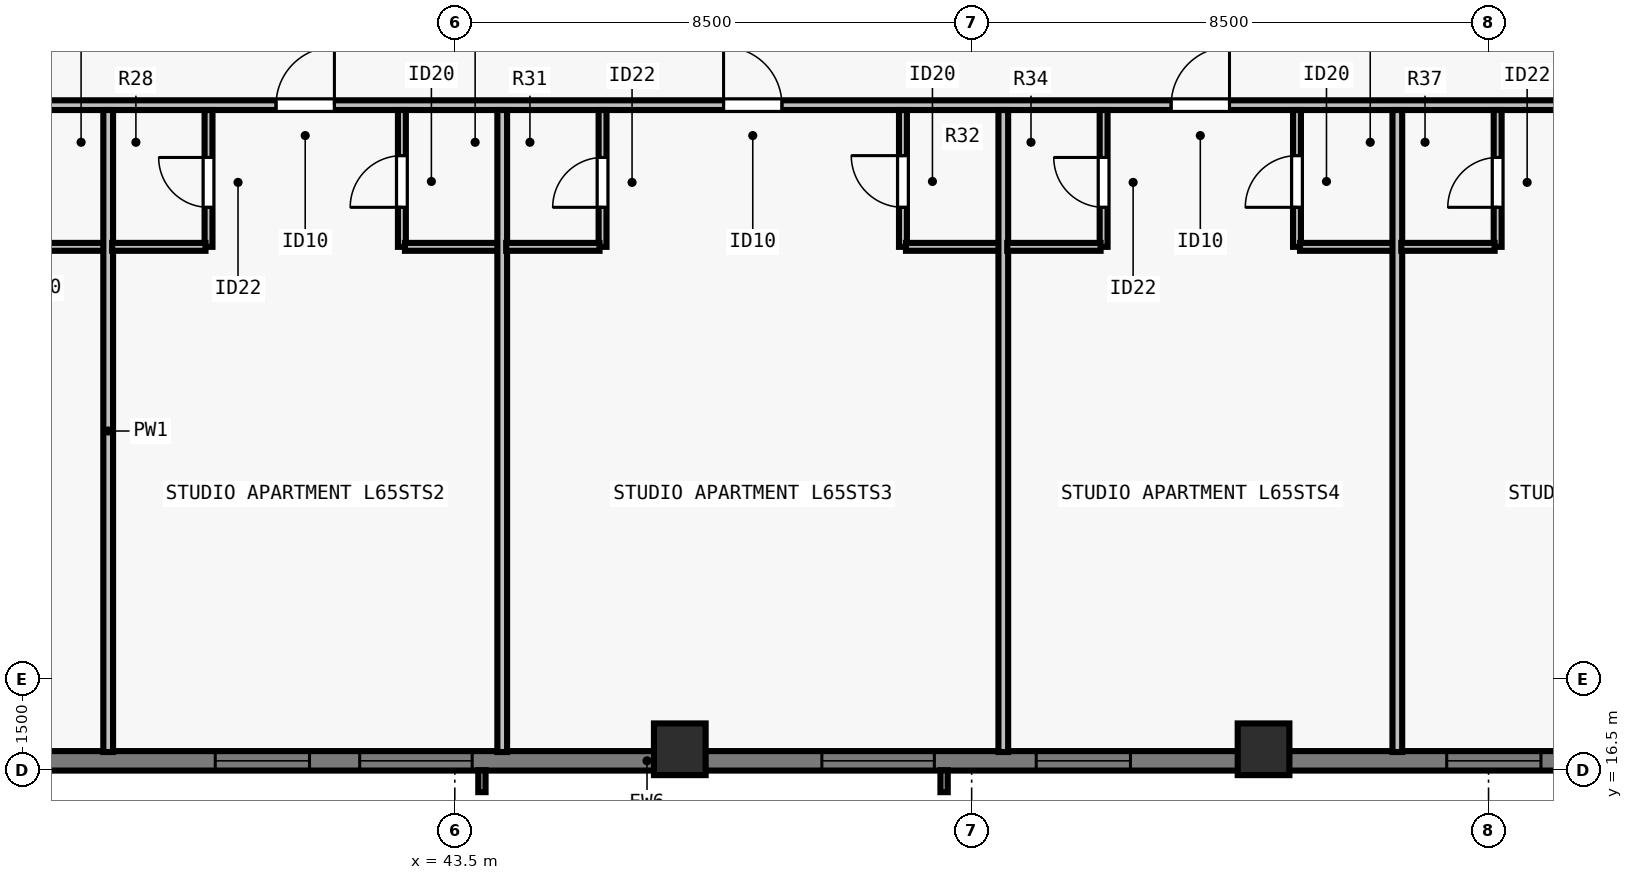
"""IFC4 building model, lengths in metres.
Left out: names, types, materials, properties, quantities, classifications, styles, units other than length and angle.
Written with IfcOpenShell. Run it as: python <this file> out.ifc"""

import sys

from ifc_helpers import new_model, si_unit, direction, frame, frame_2d, origin, origin_2d, place, context, subcontext, project, spatial, rectangle, extrude, element, fill, save


model = new_model("IFC4")
c1 = context("Model", 3, precision=1e-05, world=origin(), true_north=direction((0.0, 1.0)))
c2 = subcontext(c1, "Body", "Model", "MODEL_VIEW")
j1 = project(units=[si_unit("LENGTHUNIT", "METRE"), si_unit("PLANEANGLEUNIT", "RADIAN")], contexts=[c1])
p1 = place(None, origin())
s1 = spatial("IfcSite", under=j1, at=p1, CompositionType="ELEMENT")
p2 = place(p1, origin())
s2 = spatial("IfcBuilding", under=s1, at=p2, CompositionType="ELEMENT")
p3 = place(p2, frame((0.0, 0.0, 237.5)))
s3 = spatial("IfcBuildingStorey", under=s2, at=p3, CompositionType="ELEMENT", Elevation=237.5)
for number, where, z_axis, x_axis in (
    (1, (47.2, 16.85, 0.0), (0.0, 0.0, 1.0), (1.0, 0.0, 0.0)),
    (2, (56.8, 16.85, 0.0), (0.0, 0.0, 1.0), (1.0, 0.0, 0.0)),
):
    element("IfcColumn", number, at=place(p3, frame(where, z_axis=z_axis, x_axis=x_axis)), inside=s3, PredefinedType="COLUMN", context=c2, shape_type="SweptSolid", body=[
        extrude(rectangle(XDim=0.85, YDim=0.85, at=origin_2d()), origin(), (0.0, 0.0, 1.0), 3.5),
    ])
p4 = place(p3, frame((69.5, 16.66, 0.0), z_axis=(0.0, 0.0, 1.0), x_axis=(-1.0, 0.0, 0.0)))
e3 = element("IfcWall", 3, at=p4, inside=s3, PredefinedType="SOLIDWALL", context=c2, shape_type="SweptSolid", body=[
    extrude(rectangle(XDim=34.702, YDim=0.32, at=frame_2d((17.351, 0.0))), origin(), (0.0, 0.0, 1.0), 3.29),
])
p5 = place(p4, frame((4.613, 0.0, 0.8)))
e4 = element("IfcOpeningElement", 4, at=p5, cuts=e3, PredefinedType="OPENING", context=c2, shape_type="SweptSolid", body=[
    extrude(rectangle(XDim=1.85, YDim=1.678, at=frame_2d((0.925, 0.839))), frame((0.0, 0.17, 0.0), z_axis=(0.0, -1.0, 0.0), x_axis=(1.0, 0.0, 0.0)), (0.0, 0.0, 1.0), 0.34),
])
p6 = place(p4, frame((8.138, 0.0, 0.8)))
e5 = element("IfcOpeningElement", 5, at=p6, cuts=e3, PredefinedType="OPENING", context=c2, shape_type="SweptSolid", body=[
    extrude(rectangle(XDim=1.55, YDim=1.678, at=frame_2d((0.775, 0.839))), frame((0.0, 0.17, 0.0), z_axis=(0.0, -1.0, 0.0), x_axis=(1.0, 0.0, 0.0)), (0.0, 0.0, 1.0), 0.34),
])
p7 = place(p4, frame((14.888, 0.0, 0.8)))
e6 = element("IfcOpeningElement", 6, at=p7, cuts=e3, PredefinedType="OPENING", context=c2, shape_type="SweptSolid", body=[
    extrude(rectangle(XDim=1.55, YDim=1.678, at=frame_2d((0.775, 0.839))), frame((0.0, 0.17, 0.0), z_axis=(0.0, -1.0, 0.0), x_axis=(1.0, 0.0, 0.0)), (0.0, 0.0, 1.0), 0.34),
])
p8 = place(p4, frame((18.114, 0.0, 0.8)))
e7 = element("IfcOpeningElement", 7, at=p8, cuts=e3, PredefinedType="OPENING", context=c2, shape_type="SweptSolid", body=[
    extrude(rectangle(XDim=1.85, YDim=1.678, at=frame_2d((0.925, 0.839))), frame((0.0, 0.17, 0.0), z_axis=(0.0, -1.0, 0.0), x_axis=(1.0, 0.0, 0.0)), (0.0, 0.0, 1.0), 0.34),
])
p9 = place(p4, frame((25.714, 0.0, 0.8)))
e8 = element("IfcOpeningElement", 8, at=p9, cuts=e3, PredefinedType="OPENING", context=c2, shape_type="SweptSolid", body=[
    extrude(rectangle(XDim=1.85, YDim=1.678, at=frame_2d((0.925, 0.839))), frame((0.0, 0.17, 0.0), z_axis=(0.0, -1.0, 0.0), x_axis=(1.0, 0.0, 0.0)), (0.0, 0.0, 1.0), 0.34),
])
p10 = place(p4, frame((28.389, 0.0, 0.8)))
e9 = element("IfcOpeningElement", 9, at=p10, cuts=e3, PredefinedType="OPENING", context=c2, shape_type="SweptSolid", body=[
    extrude(rectangle(XDim=1.55, YDim=1.678, at=frame_2d((0.775, 0.839))), frame((0.0, 0.17, 0.0), z_axis=(0.0, -1.0, 0.0), x_axis=(1.0, 0.0, 0.0)), (0.0, 0.0, 1.0), 0.34),
])
p11 = place(p3, frame((29.805, 27.442, 0.0), z_axis=(0.0, 0.0, 1.0), x_axis=(1.0, 0.0, 0.0)))
e10 = element("IfcWall", 10, at=p11, inside=s3, PredefinedType="PARTITIONING", context=c2, shape_type="SweptSolid", body=[
    extrude(rectangle(XDim=44.39, YDim=0.16, at=frame_2d((22.195, 0.0))), origin(), (0.0, 0.0, 1.0), 2.958),
])
p12 = place(p11, frame((3.575, 0.0, 0.0)))
e11 = element("IfcOpeningElement", 11, at=p12, cuts=e10, PredefinedType="OPENING", context=c2, shape_type="SweptSolid", body=[
    extrude(rectangle(XDim=0.96, YDim=2.18, at=frame_2d((0.48, 1.09))), frame((0.0, 0.09, 0.0), z_axis=(0.0, -1.0, 0.0), x_axis=(1.0, 0.0, 0.0)), (0.0, 0.0, 1.0), 0.18),
])
p13 = place(p11, frame((10.755, 0.0, 0.0)))
e12 = element("IfcOpeningElement", 12, at=p13, cuts=e10, PredefinedType="OPENING", context=c2, shape_type="SweptSolid", body=[
    extrude(rectangle(XDim=0.96, YDim=2.18, at=frame_2d((0.48, 1.09))), frame((0.0, 0.09, 0.0), z_axis=(0.0, -1.0, 0.0), x_axis=(1.0, 0.0, 0.0)), (0.0, 0.0, 1.0), 0.18),
])
p14 = place(p11, frame((18.115, 0.0, 0.0)))
e13 = element("IfcOpeningElement", 13, at=p14, cuts=e10, PredefinedType="OPENING", context=c2, shape_type="SweptSolid", body=[
    extrude(rectangle(XDim=0.96, YDim=2.18, at=frame_2d((0.48, 1.09))), frame((0.0, 0.09, 0.0), z_axis=(0.0, -1.0, 0.0), x_axis=(1.0, 0.0, 0.0)), (0.0, 0.0, 1.0), 0.18),
])
p15 = place(p11, frame((25.475, 0.0, 0.0)))
e14 = element("IfcOpeningElement", 14, at=p15, cuts=e10, PredefinedType="OPENING", context=c2, shape_type="SweptSolid", body=[
    extrude(rectangle(XDim=0.96, YDim=2.18, at=frame_2d((0.48, 1.09))), frame((0.0, 0.09, 0.0), z_axis=(0.0, -1.0, 0.0), x_axis=(1.0, 0.0, 0.0)), (0.0, 0.0, 1.0), 0.18),
])
p16 = place(p11, frame((32.835, 0.0, 0.0)))
e15 = element("IfcOpeningElement", 15, at=p16, cuts=e10, PredefinedType="OPENING", context=c2, shape_type="SweptSolid", body=[
    extrude(rectangle(XDim=0.96, YDim=2.18, at=frame_2d((0.48, 1.09))), frame((0.0, 0.09, 0.0), z_axis=(0.0, -1.0, 0.0), x_axis=(1.0, 0.0, 0.0)), (0.0, 0.0, 1.0), 0.18),
])
p17 = place(p11, frame((40.375, 0.0, 0.0)))
e16 = element("IfcOpeningElement", 16, at=p17, cuts=e10, PredefinedType="OPENING", context=c2, shape_type="SweptSolid", body=[
    extrude(rectangle(XDim=0.96, YDim=2.18, at=frame_2d((0.48, 1.09))), frame((0.0, 0.09, 0.0), z_axis=(0.0, -1.0, 0.0), x_axis=(1.0, 0.0, 0.0)), (0.0, 0.0, 1.0), 0.18),
])
p18 = place(p3, frame((36.2, 25.113, 0.0), z_axis=(0.0, 0.0, 1.0), x_axis=(1.0, 0.0, 0.0)))
e17 = element("IfcWall", 17, at=p18, inside=s3, PredefinedType="PLUMBINGWALL", context=c2, shape_type="SweptSolid", body=[
    extrude(rectangle(XDim=1.6, YDim=0.13, at=frame_2d((0.8, 0.0))), origin(), (0.0, 0.0, 1.0), 3.29),
])
p19 = place(p3, frame((37.8, 16.805, 0.0), z_axis=(0.0, 0.0, 1.0), x_axis=(0.0, 1.0, 0.0)))
e18 = element("IfcWall", 18, at=p19, inside=s3, PredefinedType="PARTITIONING", context=c2, shape_type="SweptSolid", body=[
    extrude(rectangle(XDim=10.558, YDim=0.16, at=frame_2d((5.279, 0.0))), origin(), (0.0, 0.0, 1.0), 2.573),
])
p20 = place(p3, frame((39.45, 25.113, 0.0), z_axis=(0.0, 0.0, 1.0), x_axis=(0.0, 1.0, 0.0)))
e19 = element("IfcWall", 19, at=p20, inside=s3, PredefinedType="PLUMBINGWALL", context=c2, shape_type="SweptSolid", body=[
    extrude(rectangle(XDim=2.25, YDim=0.13, at=frame_2d((1.125, 0.0))), origin(), (0.0, 0.0, 1.0), 3.29),
])
p21 = place(p20, frame((0.65, 0.0, 0.0)))
e20 = element("IfcOpeningElement", 20, at=p21, cuts=e19, PredefinedType="OPENING", context=c2, shape_type="SweptSolid", body=[
    extrude(rectangle(XDim=0.82, YDim=2.1, at=frame_2d((0.41, 1.05))), frame((0.0, 0.075, 0.0), z_axis=(0.0, -1.0, 0.0), x_axis=(1.0, 0.0, 0.0)), (0.0, 0.0, 1.0), 0.15),
])
p22 = place(p3, frame((37.865, 25.113, 0.0), z_axis=(0.0, 0.0, 1.0), x_axis=(1.0, 0.0, 0.0)))
e21 = element("IfcWall", 21, at=p22, inside=s3, PredefinedType="PLUMBINGWALL", context=c2, shape_type="SweptSolid", body=[
    extrude(rectangle(XDim=1.535, YDim=0.13, at=frame_2d((0.768, 0.0))), origin(), (0.0, 0.0, 1.0), 3.29),
])
p23 = place(p3, frame((42.63, 25.113, 0.0), z_axis=(0.0, 0.0, 1.0), x_axis=(0.0, 1.0, 0.0)))
e22 = element("IfcWall", 22, at=p23, inside=s3, PredefinedType="PLUMBINGWALL", context=c2, shape_type="SweptSolid", body=[
    extrude(rectangle(XDim=2.25, YDim=0.13, at=frame_2d((1.125, 0.0))), origin(), (0.0, 0.0, 1.0), 3.29),
])
p24 = place(p23, frame((0.65, 0.0, 0.0)))
e23 = element("IfcOpeningElement", 23, at=p24, cuts=e22, PredefinedType="OPENING", context=c2, shape_type="SweptSolid", body=[
    extrude(rectangle(XDim=0.85, YDim=2.1, at=frame_2d((0.425, 1.05))), frame((0.0, 0.075, 0.0), z_axis=(0.0, -1.0, 0.0), x_axis=(1.0, 0.0, 0.0)), (0.0, 0.0, 1.0), 0.15),
])
p25 = place(p3, frame((42.68, 25.113, 0.0), z_axis=(0.0, 0.0, 1.0), x_axis=(1.0, 0.0, 0.0)))
e24 = element("IfcWall", 24, at=p25, inside=s3, PredefinedType="PLUMBINGWALL", context=c2, shape_type="SweptSolid", body=[
    extrude(rectangle(XDim=1.6, YDim=0.13, at=frame_2d((0.8, 0.0))), origin(), (0.0, 0.0, 1.0), 3.29),
])
p26 = place(p3, frame((44.28, 16.805, 0.0), z_axis=(0.0, 0.0, 1.0), x_axis=(0.0, 1.0, 0.0)))
e25 = element("IfcWall", 25, at=p26, inside=s3, PredefinedType="PARTITIONING", context=c2, shape_type="SweptSolid", body=[
    extrude(rectangle(XDim=10.558, YDim=0.16, at=frame_2d((5.279, 0.0))), origin(), (0.0, 0.0, 1.0), 3.29),
])
p27 = place(p3, frame((45.93, 25.113, 0.0), z_axis=(0.0, 0.0, 1.0), x_axis=(0.0, 1.0, 0.0)))
e26 = element("IfcWall", 26, at=p27, inside=s3, PredefinedType="PLUMBINGWALL", context=c2, shape_type="SweptSolid", body=[
    extrude(rectangle(XDim=2.25, YDim=0.13, at=frame_2d((1.125, 0.0))), origin(), (0.0, 0.0, 1.0), 3.29),
])
p28 = place(p27, frame((0.65, 0.0, 0.0)))
e27 = element("IfcOpeningElement", 27, at=p28, cuts=e26, PredefinedType="OPENING", context=c2, shape_type="SweptSolid", body=[
    extrude(rectangle(XDim=0.82, YDim=2.1, at=frame_2d((0.41, 1.05))), frame((0.0, 0.075, 0.0), z_axis=(0.0, -1.0, 0.0), x_axis=(1.0, 0.0, 0.0)), (0.0, 0.0, 1.0), 0.15),
])
p29 = place(p3, frame((44.345, 25.113, 0.0), z_axis=(0.0, 0.0, 1.0), x_axis=(1.0, 0.0, 0.0)))
e28 = element("IfcWall", 28, at=p29, inside=s3, PredefinedType="PLUMBINGWALL", context=c2, shape_type="SweptSolid", body=[
    extrude(rectangle(XDim=1.535, YDim=0.13, at=frame_2d((0.768, 0.0))), origin(), (0.0, 0.0, 1.0), 3.29),
])
p30 = place(p3, frame((50.87, 25.113, 0.0), z_axis=(0.0, 0.0, 1.0), x_axis=(0.0, 1.0, 0.0)))
e29 = element("IfcWall", 29, at=p30, inside=s3, PredefinedType="PLUMBINGWALL", context=c2, shape_type="SweptSolid", body=[
    extrude(rectangle(XDim=2.25, YDim=0.13, at=frame_2d((1.125, 0.0))), origin(), (0.0, 0.0, 1.0), 3.29),
])
p31 = place(p30, frame((0.65, 0.0, 0.0)))
e30 = element("IfcOpeningElement", 30, at=p31, cuts=e29, PredefinedType="OPENING", context=c2, shape_type="SweptSolid", body=[
    extrude(rectangle(XDim=0.85, YDim=2.1, at=frame_2d((0.425, 1.05))), frame((0.0, 0.075, 0.0), z_axis=(0.0, -1.0, 0.0), x_axis=(1.0, 0.0, 0.0)), (0.0, 0.0, 1.0), 0.15),
])
p32 = place(p3, frame((50.92, 25.113, 0.0), z_axis=(0.0, 0.0, 1.0), x_axis=(1.0, 0.0, 0.0)))
e31 = element("IfcWall", 31, at=p32, inside=s3, PredefinedType="PLUMBINGWALL", context=c2, shape_type="SweptSolid", body=[
    extrude(rectangle(XDim=1.6, YDim=0.13, at=frame_2d((0.8, 0.0))), origin(), (0.0, 0.0, 1.0), 3.29),
])
p33 = place(p3, frame((52.52, 16.805, 0.0), z_axis=(0.0, 0.0, 1.0), x_axis=(0.0, 1.0, 0.0)))
e32 = element("IfcWall", 32, at=p33, inside=s3, PredefinedType="PARTITIONING", context=c2, shape_type="SweptSolid", body=[
    extrude(rectangle(XDim=10.558, YDim=0.16, at=frame_2d((5.279, 0.0))), origin(), (0.0, 0.0, 1.0), 2.958),
])
p34 = place(p3, frame((54.17, 25.113, 0.0), z_axis=(0.0, 0.0, 1.0), x_axis=(0.0, 1.0, 0.0)))
e33 = element("IfcWall", 33, at=p34, inside=s3, PredefinedType="PLUMBINGWALL", context=c2, shape_type="SweptSolid", body=[
    extrude(rectangle(XDim=2.25, YDim=0.13, at=frame_2d((1.125, 0.0))), origin(), (0.0, 0.0, 1.0), 2.958),
])
p35 = place(p34, frame((0.65, 0.0, 0.0)))
e34 = element("IfcOpeningElement", 34, at=p35, cuts=e33, PredefinedType="OPENING", context=c2, shape_type="SweptSolid", body=[
    extrude(rectangle(XDim=0.82, YDim=2.1, at=frame_2d((0.41, 1.05))), frame((0.0, 0.075, 0.0), z_axis=(0.0, -1.0, 0.0), x_axis=(1.0, 0.0, 0.0)), (0.0, 0.0, 1.0), 0.15),
])
p36 = place(p3, frame((52.585, 25.113, 0.0), z_axis=(0.0, 0.0, 1.0), x_axis=(1.0, 0.0, 0.0)))
e35 = element("IfcWall", 35, at=p36, inside=s3, PredefinedType="PLUMBINGWALL", context=c2, shape_type="SweptSolid", body=[
    extrude(rectangle(XDim=1.535, YDim=0.13, at=frame_2d((0.768, 0.0))), origin(), (0.0, 0.0, 1.0), 3.29),
])
p37 = place(p3, frame((57.35, 25.113, 0.0), z_axis=(0.0, 0.0, 1.0), x_axis=(0.0, 1.0, 0.0)))
e36 = element("IfcWall", 36, at=p37, inside=s3, PredefinedType="PLUMBINGWALL", context=c2, shape_type="SweptSolid", body=[
    extrude(rectangle(XDim=2.25, YDim=0.13, at=frame_2d((1.125, 0.0))), origin(), (0.0, 0.0, 1.0), 3.29),
])
p38 = place(p37, frame((0.65, 0.0, 0.0)))
e37 = element("IfcOpeningElement", 37, at=p38, cuts=e36, PredefinedType="OPENING", context=c2, shape_type="SweptSolid", body=[
    extrude(rectangle(XDim=0.85, YDim=2.1, at=frame_2d((0.425, 1.05))), frame((0.0, 0.075, 0.0), z_axis=(0.0, -1.0, 0.0), x_axis=(1.0, 0.0, 0.0)), (0.0, 0.0, 1.0), 0.15),
])
p39 = place(p3, frame((57.4, 25.113, 0.0), z_axis=(0.0, 0.0, 1.0), x_axis=(1.0, 0.0, 0.0)))
e38 = element("IfcWall", 38, at=p39, inside=s3, PredefinedType="PLUMBINGWALL", context=c2, shape_type="SweptSolid", body=[
    extrude(rectangle(XDim=1.6, YDim=0.13, at=frame_2d((0.8, 0.0))), origin(), (0.0, 0.0, 1.0), 3.29),
])
p40 = place(p3, frame((59.0, 16.805, 0.0), z_axis=(0.0, 0.0, 1.0), x_axis=(0.0, 1.0, 0.0)))
e39 = element("IfcWall", 39, at=p40, inside=s3, PredefinedType="PARTITIONING", context=c2, shape_type="SweptSolid", body=[
    extrude(rectangle(XDim=10.558, YDim=0.16, at=frame_2d((5.279, 0.0))), origin(), (0.0, 0.0, 1.0), 3.29),
])
p41 = place(p3, frame((60.65, 25.113, 0.0), z_axis=(0.0, 0.0, 1.0), x_axis=(0.0, 1.0, 0.0)))
e40 = element("IfcWall", 40, at=p41, inside=s3, PredefinedType="PLUMBINGWALL", context=c2, shape_type="SweptSolid", body=[
    extrude(rectangle(XDim=2.25, YDim=0.13, at=frame_2d((1.125, 0.0))), origin(), (0.0, 0.0, 1.0), 3.29),
])
p42 = place(p41, frame((0.65, 0.0, 0.0)))
e41 = element("IfcOpeningElement", 41, at=p42, cuts=e40, PredefinedType="OPENING", context=c2, shape_type="SweptSolid", body=[
    extrude(rectangle(XDim=0.82, YDim=2.1, at=frame_2d((0.41, 1.05))), frame((0.0, 0.075, 0.0), z_axis=(0.0, -1.0, 0.0), x_axis=(1.0, 0.0, 0.0)), (0.0, 0.0, 1.0), 0.15),
])
p43 = place(p3, frame((59.065, 25.113, 0.0), z_axis=(0.0, 0.0, 1.0), x_axis=(1.0, 0.0, 0.0)))
e42 = element("IfcWall", 42, at=p43, inside=s3, PredefinedType="PLUMBINGWALL", context=c2, shape_type="SweptSolid", body=[
    extrude(rectangle(XDim=1.535, YDim=0.13, at=frame_2d((0.768, 0.0))), origin(), (0.0, 0.0, 1.0), 3.29),
])
p44 = place(p6, origin())
e43 = element("IfcWindow", 43, at=p44, inside=s3, PartitioningType="SINGLE_PANEL", PredefinedType="WINDOW", context=c2, shape_type="SweptSolid", body=[
    extrude(rectangle(XDim=1.55, YDim=1.678, at=frame_2d((0.775, 0.839))), frame((0.0, -0.05, 0.0), z_axis=(0.0, -1.0, 0.0), x_axis=(1.0, 0.0, 0.0)), (0.0, 0.0, 1.0), 0.06),
])
fill(e5, e43)
p45 = place(p7, origin())
e44 = element("IfcWindow", 44, at=p45, inside=s3, PartitioningType="SINGLE_PANEL", PredefinedType="WINDOW", context=c2, shape_type="SweptSolid", body=[
    extrude(rectangle(XDim=1.55, YDim=1.678, at=frame_2d((0.775, 0.839))), frame((0.0, -0.05, 0.0), z_axis=(0.0, -1.0, 0.0), x_axis=(1.0, 0.0, 0.0)), (0.0, 0.0, 1.0), 0.06),
])
fill(e6, e44)
p46 = place(p8, origin())
e45 = element("IfcWindow", 45, at=p46, inside=s3, PartitioningType="SINGLE_PANEL", PredefinedType="WINDOW", context=c2, shape_type="SweptSolid", body=[
    extrude(rectangle(XDim=1.85, YDim=1.678, at=frame_2d((0.925, 0.839))), frame((0.0, -0.05, 0.0), z_axis=(0.0, -1.0, 0.0), x_axis=(1.0, 0.0, 0.0)), (0.0, 0.0, 1.0), 0.06),
])
fill(e7, e45)
p47 = place(p9, origin())
e46 = element("IfcWindow", 46, at=p47, inside=s3, PartitioningType="SINGLE_PANEL", PredefinedType="WINDOW", context=c2, shape_type="SweptSolid", body=[
    extrude(rectangle(XDim=1.85, YDim=1.678, at=frame_2d((0.925, 0.839))), frame((0.0, -0.05, 0.0), z_axis=(0.0, -1.0, 0.0), x_axis=(1.0, 0.0, 0.0)), (0.0, 0.0, 1.0), 0.06),
])
fill(e8, e46)
p48 = place(p10, origin())
e47 = element("IfcWindow", 47, at=p48, inside=s3, PartitioningType="SINGLE_PANEL", PredefinedType="WINDOW", context=c2, shape_type="SweptSolid", body=[
    extrude(rectangle(XDim=1.55, YDim=1.678, at=frame_2d((0.775, 0.839))), frame((0.0, -0.05, 0.0), z_axis=(0.0, -1.0, 0.0), x_axis=(1.0, 0.0, 0.0)), (0.0, 0.0, 1.0), 0.06),
])
fill(e9, e47)
p49 = place(p21, origin())
e48 = element("IfcDoor", 48, at=p49, inside=s3, OperationType="SINGLE_SWING_RIGHT", PredefinedType="DOOR", context=c2, shape_type="SweptSolid", body=[
    extrude(rectangle(XDim=0.82, YDim=2.1, at=frame_2d((0.41, 1.05))), frame((0.0, 0.025, 0.0), z_axis=(0.0, -1.0, 0.0), x_axis=(1.0, 0.0, 0.0)), (0.0, 0.0, 1.0), 0.05),
])
fill(e20, e48)
p50 = place(p24, origin())
e49 = element("IfcDoor", 49, at=p50, inside=s3, OperationType="SINGLE_SWING_LEFT", PredefinedType="DOOR", context=c2, shape_type="SweptSolid", body=[
    extrude(rectangle(XDim=0.85, YDim=2.1, at=frame_2d((0.425, 1.05))), frame((0.0, 0.025, 0.0), z_axis=(0.0, -1.0, 0.0), x_axis=(1.0, 0.0, 0.0)), (0.0, 0.0, 1.0), 0.05),
])
fill(e23, e49)
p51 = place(p13, origin())
e50 = element("IfcDoor", 50, at=p51, inside=s3, OperationType="SINGLE_SWING_RIGHT", PredefinedType="DOOR", context=c2, shape_type="SweptSolid", body=[
    extrude(rectangle(XDim=0.96, YDim=2.18, at=frame_2d((0.48, 1.09))), frame((0.0, 0.025, 0.0), z_axis=(0.0, -1.0, 0.0), x_axis=(1.0, 0.0, 0.0)), (0.0, 0.0, 1.0), 0.05),
])
fill(e12, e50)
p52 = place(p28, origin())
e51 = element("IfcDoor", 51, at=p52, inside=s3, OperationType="SINGLE_SWING_LEFT", PredefinedType="DOOR", context=c2, shape_type="SweptSolid", body=[
    extrude(rectangle(XDim=0.82, YDim=2.1, at=frame_2d((0.41, 1.05))), frame((0.0, 0.025, 0.0), z_axis=(0.0, -1.0, 0.0), x_axis=(1.0, 0.0, 0.0)), (0.0, 0.0, 1.0), 0.05),
])
fill(e27, e51)
p53 = place(p31, origin())
e52 = element("IfcDoor", 52, at=p53, inside=s3, OperationType="SINGLE_SWING_RIGHT", PredefinedType="DOOR", context=c2, shape_type="SweptSolid", body=[
    extrude(rectangle(XDim=0.85, YDim=2.1, at=frame_2d((0.425, 1.05))), frame((0.0, 0.025, 0.0), z_axis=(0.0, -1.0, 0.0), x_axis=(1.0, 0.0, 0.0)), (0.0, 0.0, 1.0), 0.05),
])
fill(e30, e52)
p54 = place(p14, origin())
e53 = element("IfcDoor", 53, at=p54, inside=s3, OperationType="SINGLE_SWING_LEFT", PredefinedType="DOOR", context=c2, shape_type="SweptSolid", body=[
    extrude(rectangle(XDim=0.96, YDim=2.18, at=frame_2d((0.48, 1.09))), frame((0.0, 0.025, 0.0), z_axis=(0.0, -1.0, 0.0), x_axis=(1.0, 0.0, 0.0)), (0.0, 0.0, 1.0), 0.05),
])
fill(e13, e53)
p55 = place(p35, origin())
e54 = element("IfcDoor", 54, at=p55, inside=s3, OperationType="SINGLE_SWING_RIGHT", PredefinedType="DOOR", context=c2, shape_type="SweptSolid", body=[
    extrude(rectangle(XDim=0.82, YDim=2.1, at=frame_2d((0.41, 1.05))), frame((0.0, 0.025, 0.0), z_axis=(0.0, -1.0, 0.0), x_axis=(1.0, 0.0, 0.0)), (0.0, 0.0, 1.0), 0.05),
])
fill(e34, e54)
p56 = place(p38, origin())
e55 = element("IfcDoor", 55, at=p56, inside=s3, OperationType="SINGLE_SWING_LEFT", PredefinedType="DOOR", context=c2, shape_type="SweptSolid", body=[
    extrude(rectangle(XDim=0.85, YDim=2.1, at=frame_2d((0.425, 1.05))), frame((0.0, 0.025, 0.0), z_axis=(0.0, -1.0, 0.0), x_axis=(1.0, 0.0, 0.0)), (0.0, 0.0, 1.0), 0.05),
])
fill(e37, e55)
p57 = place(p15, origin())
e56 = element("IfcDoor", 56, at=p57, inside=s3, OperationType="SINGLE_SWING_RIGHT", PredefinedType="DOOR", context=c2, shape_type="SweptSolid", body=[
    extrude(rectangle(XDim=0.96, YDim=2.18, at=frame_2d((0.48, 1.09))), frame((0.0, 0.025, 0.0), z_axis=(0.0, -1.0, 0.0), x_axis=(1.0, 0.0, 0.0)), (0.0, 0.0, 1.0), 0.05),
])
fill(e14, e56)
p58 = place(p42, origin())
e57 = element("IfcDoor", 57, at=p58, inside=s3, OperationType="SINGLE_SWING_LEFT", PredefinedType="DOOR", context=c2, shape_type="SweptSolid", body=[
    extrude(rectangle(XDim=0.82, YDim=2.1, at=frame_2d((0.41, 1.05))), frame((0.0, 0.025, 0.0), z_axis=(0.0, -1.0, 0.0), x_axis=(1.0, 0.0, 0.0)), (0.0, 0.0, 1.0), 0.05),
])
fill(e41, e57)
save(model, sys.argv[1])
